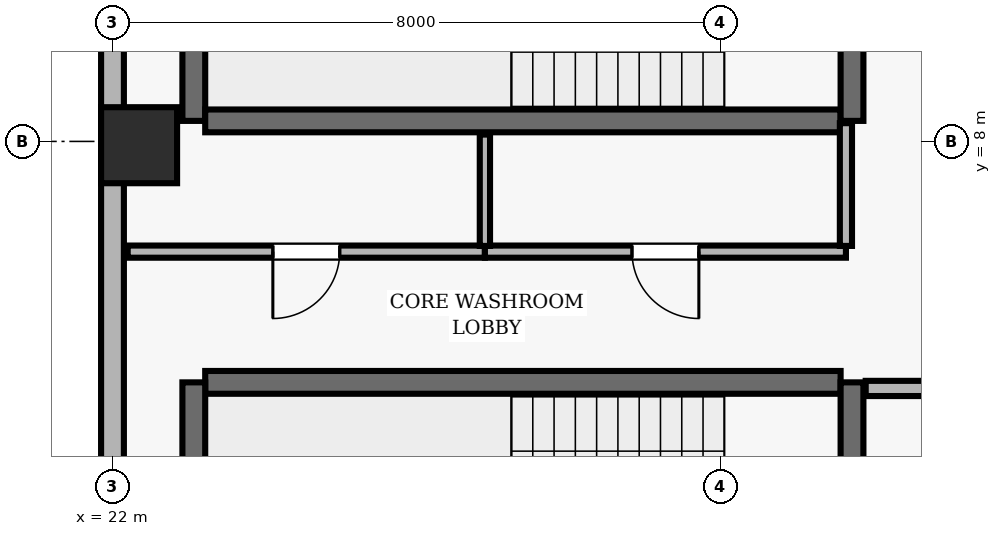
"""IFC4 building model, lengths in metres.
Left out: names, types, materials, properties, quantities, classifications, styles, units other than length and angle.
Written with IfcOpenShell. Run it as: python <this file> out.ifc"""

import sys

from ifc_helpers import new_model, si_unit, direction, frame, frame_2d, origin, origin_2d, place, context, subcontext, project, spatial, rectangle, extrude, element, fill, save


model = new_model("IFC4")
c1 = context("Model", 3, precision=1e-05, world=origin(), true_north=direction((0.0, 1.0)))
c2 = subcontext(c1, "Body", "Model", "MODEL_VIEW")
j1 = project(units=[si_unit("LENGTHUNIT", "METRE"), si_unit("PLANEANGLEUNIT", "RADIAN")], contexts=[c1])
p1 = place(None, origin())
s1 = spatial("IfcSite", under=j1, at=p1, CompositionType="ELEMENT")
p2 = place(p1, origin())
s2 = spatial("IfcBuilding", under=s1, at=p2, CompositionType="ELEMENT")
p3 = place(p2, frame((0.0, 0.0, 203.1)))
s3 = spatial("IfcBuildingStorey", under=s2, at=p3, CompositionType="ELEMENT", Elevation=203.1)
p4 = place(p3, frame((22.35, 7.95, 0.0), z_axis=(0.0, 0.0, 1.0), x_axis=(1.0, 0.0, 0.0)))
e1 = element("IfcColumn", 1, at=p4, inside=s3, PredefinedType="COLUMN", context=c2, shape_type="SweptSolid", body=[
    extrude(rectangle(XDim=1.0, YDim=1.0, at=origin_2d()), origin(), (0.0, 0.0, 1.0), 3.9),
])
p5 = place(p3, frame((22.0, 40.7, 0.0), z_axis=(0.0, 0.0, 1.0), x_axis=(0.0, -1.0, 0.0)))
e2 = element("IfcWall", 2, at=p5, inside=s3, PredefinedType="SOLIDWALL", context=c2, shape_type="SweptSolid", body=[
    extrude(rectangle(XDim=38.2, YDim=0.3, at=frame_2d((19.1, 0.0))), origin(), (0.0, 0.0, 1.0), 3.69),
])
p6 = place(p5, frame((7.8, 0.0, 0.0)))
e3 = element("IfcOpeningElement", 3, at=p6, cuts=e2, PredefinedType="OPENING", context=c2, shape_type="SweptSolid", body=[
    extrude(rectangle(XDim=1.0, YDim=2.2, at=frame_2d((0.5, 1.1))), frame((0.0, 0.16, 0.0), z_axis=(0.0, -1.0, 0.0), x_axis=(1.0, 0.0, 0.0)), (0.0, 0.0, 1.0), 0.32),
])
p7 = place(p5, frame((1.979, 0.0, 0.9)))
e4 = element("IfcOpeningElement", 4, at=p7, cuts=e2, PredefinedType="OPENING", context=c2, shape_type="SweptSolid", body=[
    extrude(rectangle(XDim=1.5, YDim=1.6, at=frame_2d((0.75, 0.8))), frame((0.0, 0.16, 0.0), z_axis=(0.0, -1.0, 0.0), x_axis=(1.0, 0.0, 0.0)), (0.0, 0.0, 1.0), 0.32),
])
p8 = place(p5, frame((12.443, 0.0, 0.9)))
e5 = element("IfcOpeningElement", 5, at=p8, cuts=e2, PredefinedType="OPENING", context=c2, shape_type="SweptSolid", body=[
    extrude(rectangle(XDim=1.5, YDim=1.6, at=frame_2d((0.75, 0.8))), frame((0.0, 0.16, 0.0), z_axis=(0.0, -1.0, 0.0), x_axis=(1.0, 0.0, 0.0)), (0.0, 0.0, 1.0), 0.32),
])
p9 = place(p5, frame((18.35, 0.0, 0.9)))
e6 = element("IfcOpeningElement", 6, at=p9, cuts=e2, PredefinedType="OPENING", context=c2, shape_type="SweptSolid", body=[
    extrude(rectangle(XDim=1.5, YDim=1.6, at=frame_2d((0.75, 0.8))), frame((0.0, 0.16, 0.0), z_axis=(0.0, -1.0, 0.0), x_axis=(1.0, 0.0, 0.0)), (0.0, 0.0, 1.0), 0.32),
])
p10 = place(p5, frame((23.807, 0.0, 0.9)))
e7 = element("IfcOpeningElement", 7, at=p10, cuts=e2, PredefinedType="OPENING", context=c2, shape_type="SweptSolid", body=[
    extrude(rectangle(XDim=1.5, YDim=1.6, at=frame_2d((0.75, 0.8))), frame((0.0, 0.16, 0.0), z_axis=(0.0, -1.0, 0.0), x_axis=(1.0, 0.0, 0.0)), (0.0, 0.0, 1.0), 0.32),
])
p11 = place(p5, frame((29.264, 0.0, 0.9)))
e8 = element("IfcOpeningElement", 8, at=p11, cuts=e2, PredefinedType="OPENING", context=c2, shape_type="SweptSolid", body=[
    extrude(rectangle(XDim=1.5, YDim=1.6, at=frame_2d((0.75, 0.8))), frame((0.0, 0.16, 0.0), z_axis=(0.0, -1.0, 0.0), x_axis=(1.0, 0.0, 0.0)), (0.0, 0.0, 1.0), 0.32),
])
p12 = place(p3, frame((31.58, 4.83, 0.0), z_axis=(0.0, 0.0, 1.0), x_axis=(-1.0, 0.0, 0.0)))
e9 = element("IfcWall", 9, at=p12, inside=s3, PredefinedType="SHEAR", context=c2, shape_type="SweptSolid", body=[
    extrude(rectangle(XDim=8.36, YDim=0.3, at=frame_2d((4.18, 0.0))), origin(), (0.0, 0.0, 1.0), 3.69),
])
p13 = place(p3, frame((23.07, 4.83, 0.0), z_axis=(0.0, 0.0, 1.0), x_axis=(0.0, -1.0, 0.0)))
e10 = element("IfcWall", 10, at=p13, inside=s3, PredefinedType="SHEAR", context=c2, shape_type="SweptSolid", body=[
    extrude(rectangle(XDim=3.51, YDim=0.3, at=frame_2d((1.755, 0.0))), origin(), (0.0, 0.0, 1.0), 3.69),
])
p14 = place(p3, frame((31.73, 0.96, 0.0), z_axis=(0.0, 0.0, 1.0), x_axis=(0.0, 1.0, 0.0)))
e11 = element("IfcWall", 11, at=p14, inside=s3, PredefinedType="SHEAR", context=c2, shape_type="SweptSolid", body=[
    extrude(rectangle(XDim=3.87, YDim=0.3, at=frame_2d((1.935, 0.0))), origin(), (0.0, 0.0, 1.0), 3.69),
])
p15 = place(p14, frame((1.54, 0.0, 0.0)))
e12 = element("IfcOpeningElement", 12, at=p15, cuts=e11, PredefinedType="OPENING", context=c2, shape_type="SweptSolid", body=[
    extrude(rectangle(XDim=1.15, YDim=2.15, at=frame_2d((0.575, 1.075))), frame((0.0, 0.16, 0.0), z_axis=(0.0, -1.0, 0.0), x_axis=(1.0, 0.0, 0.0)), (0.0, 0.0, 1.0), 0.32),
])
p16 = place(p3, frame((23.07, 11.78, 0.0), z_axis=(0.0, 0.0, 1.0), x_axis=(0.0, -1.0, 0.0)))
e13 = element("IfcWall", 13, at=p16, inside=s3, PredefinedType="SHEAR", context=c2, shape_type="SweptSolid", body=[
    extrude(rectangle(XDim=3.51, YDim=0.3, at=frame_2d((1.755, 0.0))), origin(), (0.0, 0.0, 1.0), 3.69),
])
p17 = place(p3, frame((23.22, 8.27, 0.0), z_axis=(0.0, 0.0, 1.0), x_axis=(1.0, 0.0, 0.0)))
e14 = element("IfcWall", 14, at=p17, inside=s3, PredefinedType="SHEAR", context=c2, shape_type="SweptSolid", body=[
    extrude(rectangle(XDim=8.36, YDim=0.3, at=frame_2d((4.18, 0.0))), origin(), (0.0, 0.0, 1.0), 3.69),
])
p18 = place(p3, frame((31.73, 8.27, 0.0), z_axis=(0.0, 0.0, 1.0), x_axis=(0.0, 1.0, 0.0)))
e15 = element("IfcWall", 15, at=p18, inside=s3, PredefinedType="SHEAR", context=c2, shape_type="SweptSolid", body=[
    extrude(rectangle(XDim=3.51, YDim=0.3, at=frame_2d((1.755, 0.0))), origin(), (0.0, 0.0, 1.0), 3.69),
])
p19 = place(p18, frame((1.18, 0.0, 0.0)))
e16 = element("IfcOpeningElement", 16, at=p19, cuts=e15, PredefinedType="OPENING", context=c2, shape_type="SweptSolid", body=[
    extrude(rectangle(XDim=1.15, YDim=2.15, at=frame_2d((0.575, 1.075))), frame((0.0, 0.16, 0.0), z_axis=(0.0, -1.0, 0.0), x_axis=(1.0, 0.0, 0.0)), (0.0, 0.0, 1.0), 0.32),
])
p20 = place(p3, frame((26.9, 6.55, 0.0), z_axis=(0.0, 0.0, 1.0), x_axis=(-1.0, 0.0, 0.0)))
e17 = element("IfcWall", 17, at=p20, inside=s3, PredefinedType="PARTITIONING", context=c2, shape_type="SweptSolid", body=[
    extrude(rectangle(XDim=4.7, YDim=0.16, at=frame_2d((2.35, 0.0))), origin(), (0.0, 0.0, 1.0), 3.69),
])
p21 = place(p20, frame((1.91, 0.0, 0.0)))
e18 = element("IfcOpeningElement", 18, at=p21, cuts=e17, PredefinedType="OPENING", context=c2, shape_type="SweptSolid", body=[
    extrude(rectangle(XDim=0.88, YDim=2.1, at=frame_2d((0.44, 1.05))), frame((0.0, 0.09, 0.0), z_axis=(0.0, -1.0, 0.0), x_axis=(1.0, 0.0, 0.0)), (0.0, 0.0, 1.0), 0.18),
])
p22 = place(p3, frame((31.65, 6.55, 0.0), z_axis=(0.0, 0.0, 1.0), x_axis=(-1.0, 0.0, 0.0)))
e19 = element("IfcWall", 19, at=p22, inside=s3, PredefinedType="PARTITIONING", context=c2, shape_type="SweptSolid", body=[
    extrude(rectangle(XDim=4.75, YDim=0.16, at=frame_2d((2.375, 0.0))), origin(), (0.0, 0.0, 1.0), 3.69),
])
p23 = place(p22, frame((1.935, 0.0, 0.0)))
e20 = element("IfcOpeningElement", 20, at=p23, cuts=e19, PredefinedType="OPENING", context=c2, shape_type="SweptSolid", body=[
    extrude(rectangle(XDim=0.88, YDim=2.1, at=frame_2d((0.44, 1.05))), frame((0.0, 0.09, 0.0), z_axis=(0.0, -1.0, 0.0), x_axis=(1.0, 0.0, 0.0)), (0.0, 0.0, 1.0), 0.18),
])
p24 = place(p3, frame((35.02, 4.75, 0.0), z_axis=(0.0, 0.0, 1.0), x_axis=(-1.0, 0.0, 0.0)))
e21 = element("IfcWall", 21, at=p24, inside=s3, PredefinedType="SOLIDWALL", context=c2, shape_type="SweptSolid", body=[
    extrude(rectangle(XDim=3.11, YDim=0.2, at=frame_2d((1.555, 0.0))), origin(), (0.0, 0.0, 1.0), 3.69),
])
p25 = place(p24, frame((1.03, 0.0, 0.0)))
e22 = element("IfcOpeningElement", 22, at=p25, cuts=e21, PredefinedType="OPENING", context=c2, shape_type="SweptSolid", body=[
    extrude(rectangle(XDim=1.05, YDim=2.15, at=frame_2d((0.525, 1.075))), frame((0.0, 0.11, 0.0), z_axis=(0.0, -1.0, 0.0), x_axis=(1.0, 0.0, 0.0)), (0.0, 0.0, 1.0), 0.22),
])
p26 = place(p3, frame((26.9, 6.625, 0.0), z_axis=(0.0, 0.0, 1.0), x_axis=(0.0, 1.0, 0.0)))
e23 = element("IfcWall", 23, at=p26, inside=s3, PredefinedType="PARTITIONING", context=c2, shape_type="SweptSolid", body=[
    extrude(rectangle(XDim=1.465, YDim=0.135, at=frame_2d((0.732, 0.0))), origin(), (0.0, 0.0, 1.0), 3.69),
])
p27 = place(p3, frame((31.65, 8.24, 0.0), z_axis=(0.0, 0.0, 1.0), x_axis=(0.0, -1.0, 0.0)))
e24 = element("IfcWall", 24, at=p27, inside=s3, PredefinedType="PARTITIONING", context=c2, shape_type="SweptSolid", body=[
    extrude(rectangle(XDim=1.615, YDim=0.16, at=frame_2d((0.808, 0.0))), origin(), (0.0, 0.0, 1.0), 3.69),
])
p28 = place(p21, origin())
e25 = element("IfcDoor", 25, at=p28, inside=s3, OperationType="SINGLE_SWING_RIGHT", PredefinedType="DOOR", context=c2, shape_type="SweptSolid", body=[
    extrude(rectangle(XDim=0.88, YDim=2.1, at=frame_2d((0.44, 1.05))), frame((0.0, 0.025, 0.0), z_axis=(0.0, -1.0, 0.0), x_axis=(1.0, 0.0, 0.0)), (0.0, 0.0, 1.0), 0.05),
])
fill(e18, e25)
p29 = place(p23, origin())
e26 = element("IfcDoor", 26, at=p29, inside=s3, OperationType="SINGLE_SWING_LEFT", PredefinedType="DOOR", context=c2, shape_type="SweptSolid", body=[
    extrude(rectangle(XDim=0.88, YDim=2.1, at=frame_2d((0.44, 1.05))), frame((0.0, 0.025, 0.0), z_axis=(0.0, -1.0, 0.0), x_axis=(1.0, 0.0, 0.0)), (0.0, 0.0, 1.0), 0.05),
])
fill(e20, e26)
save(model, sys.argv[1])
